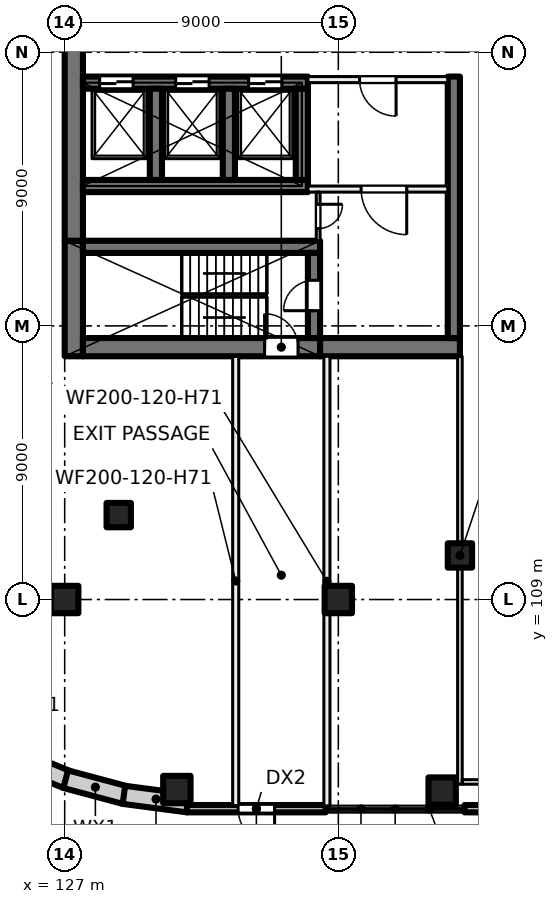
"""IFC4 building model, lengths in metres.
Left out: names, types, materials, properties, quantities, classifications, styles, units other than length and angle.
Written with IfcOpenShell. Run it as: python <this file> out.ifc"""

import sys

from ifc_helpers import new_model, si_unit, direction, frame, frame_2d, origin, origin_2d, place, context, subcontext, project, spatial, rectangle, extrude, element, fill, save


model = new_model("IFC4")
c1 = context("Model", 3, precision=1e-05, world=origin(), true_north=direction((0.0, 1.0)))
c2 = subcontext(c1, "Body", "Model", "MODEL_VIEW")
j1 = project(units=[si_unit("LENGTHUNIT", "METRE"), si_unit("PLANEANGLEUNIT", "RADIAN")], contexts=[c1])
p1 = place(None, origin())
s1 = spatial("IfcSite", under=j1, at=p1, CompositionType="ELEMENT")
p2 = place(p1, origin())
s2 = spatial("IfcBuilding", under=s1, at=p2, CompositionType="ELEMENT")
p3 = place(p2, origin())
s3 = spatial("IfcBuildingStorey", under=s2, at=p3, CompositionType="ELEMENT", Elevation=0.0)
for number, where, z_axis, x_axis in (
    (1, (127.0, 109.0, 0.0), (0.0, 0.0, 1.0), (1.0, 0.0, 0.0)),
    (2, (136.0, 109.0, 0.0), (0.0, 0.0, 1.0), (1.0, 0.0, 0.0)),
    (3, (139.416, 102.7, 0.0), (0.0, 0.0, 1.0), (1.0, 0.0, 0.0)),
    (4, (130.689, 102.75, 0.0), (0.0, 0.0, 1.0), (1.0, 0.0, 0.0)),
):
    element("IfcColumn", number, at=place(p3, frame(where, z_axis=z_axis, x_axis=x_axis)), inside=s3, PredefinedType="COLUMN", context=c2, shape_type="SweptSolid", body=[
        extrude(rectangle(XDim=0.9, YDim=0.9, at=origin_2d()), origin(), (0.0, 0.0, 1.0), 7.5),
    ])
for number, where, z_axis, x_axis in (
    (5, (128.777, 111.777, 0.0), (0.0, 0.0, 1.0), (1.0, 0.0, 0.0)),
    (6, (140.0, 110.45, 0.0), (0.0, 0.0, 1.0), (1.0, 0.0, 0.0)),
):
    element("IfcColumn", number, at=place(p3, frame(where, z_axis=z_axis, x_axis=x_axis)), inside=s3, PredefinedType="COLUMN", context=c2, shape_type="SweptSolid", body=[
        extrude(rectangle(XDim=0.8, YDim=0.8, at=origin_2d()), origin(), (0.0, 0.0, 1.0), 7.5),
    ])
p4 = place(p3, frame((127.3, 117.0, 0.0), z_axis=(0.0, 0.0, 1.0), x_axis=(0.0, 1.0, 0.0)))
e7 = element("IfcWall", 7, at=p4, inside=s3, PredefinedType="SHEAR", context=c2, shape_type="SweptSolid", body=[
    extrude(rectangle(XDim=3.8, YDim=0.6, at=frame_2d((1.9, 0.0))), origin(), (0.0, 0.0, 1.0), 7.5),
])
p5 = place(p3, frame((127.3, 120.8, 0.0), z_axis=(0.0, 0.0, 1.0), x_axis=(0.0, 1.0, 0.0)))
e8 = element("IfcWall", 8, at=p5, inside=s3, PredefinedType="SHEAR", context=c2, shape_type="SweptSolid", body=[
    extrude(rectangle(XDim=14.4, YDim=0.6, at=frame_2d((7.2, 0.0))), origin(), (0.0, 0.0, 1.0), 7.5),
])
p6 = place(p3, frame((127.6, 117.3, 0.0), z_axis=(0.0, 0.0, 1.0), x_axis=(1.0, 0.0, 0.0)))
e9 = element("IfcWall", 9, at=p6, inside=s3, PredefinedType="SHEAR", context=c2, shape_type="SweptSolid", body=[
    extrude(rectangle(XDim=7.8, YDim=0.6, at=frame_2d((3.9, 0.0))), origin(), (0.0, 0.0, 1.0), 7.5),
])
p7 = place(p6, frame((5.975, 0.0, 0.0)))
e10 = element("IfcOpeningElement", 10, at=p7, cuts=e9, PredefinedType="OPENING", context=c2, shape_type="SweptSolid", body=[
    extrude(rectangle(XDim=1.1, YDim=2.1, at=frame_2d((0.55, 1.05))), frame((0.0, 0.31, 0.0), z_axis=(0.0, -1.0, 0.0), x_axis=(1.0, 0.0, 0.0)), (0.0, 0.0, 1.0), 0.62),
])
p8 = place(p3, frame((135.4, 117.3, 0.0), z_axis=(0.0, 0.0, 1.0), x_axis=(1.0, 0.0, 0.0)))
e11 = element("IfcWall", 11, at=p8, inside=s3, PredefinedType="SHEAR", context=c2, shape_type="SweptSolid", body=[
    extrude(rectangle(XDim=4.6, YDim=0.6, at=frame_2d((2.3, 0.0))), origin(), (0.0, 0.0, 1.0), 7.5),
])
p9 = place(p3, frame((127.6, 120.6, 0.0), z_axis=(0.0, 0.0, 1.0), x_axis=(1.0, 0.0, 0.0)))
e12 = element("IfcWall", 12, at=p9, inside=s3, PredefinedType="SHEAR", context=c2, shape_type="SweptSolid", body=[
    extrude(rectangle(XDim=7.8, YDim=0.4, at=frame_2d((3.9, 0.0))), origin(), (0.0, 0.0, 1.0), 7.5),
])
p10 = place(p3, frame((135.2, 117.6, 0.0), z_axis=(0.0, 0.0, 1.0), x_axis=(0.0, 1.0, 0.0)))
e13 = element("IfcWall", 13, at=p10, inside=s3, PredefinedType="SHEAR", context=c2, shape_type="SweptSolid", body=[
    extrude(rectangle(XDim=2.8, YDim=0.4, at=frame_2d((1.4, 0.0))), origin(), (0.0, 0.0, 1.0), 7.5),
])
p11 = place(p10, frame((0.9, 0.0, 0.0)))
e14 = element("IfcOpeningElement", 14, at=p11, cuts=e13, PredefinedType="OPENING", context=c2, shape_type="SweptSolid", body=[
    extrude(rectangle(XDim=1.0, YDim=2.1, at=frame_2d((0.5, 1.05))), frame((0.0, 0.21, 0.0), z_axis=(0.0, -1.0, 0.0), x_axis=(1.0, 0.0, 0.0)), (0.0, 0.0, 1.0), 0.42),
])
p12 = place(p3, frame((127.6, 126.0, 0.0), z_axis=(0.0, 0.0, 1.0), x_axis=(1.0, 0.0, 0.0)))
e15 = element("IfcWall", 15, at=p12, inside=s3, PredefinedType="SHEAR", context=c2, shape_type="SweptSolid", body=[
    extrude(rectangle(XDim=7.4, YDim=0.4, at=frame_2d((3.7, 0.0))), origin(), (0.0, 0.0, 1.0), 7.5),
])
p13 = place(p12, frame((0.55, 0.0, 0.0)))
e16 = element("IfcOpeningElement", 16, at=p13, cuts=e15, PredefinedType="OPENING", context=c2, shape_type="SweptSolid", body=[
    extrude(rectangle(XDim=1.1, YDim=2.1, at=frame_2d((0.55, 1.05))), frame((0.0, 0.21, 0.0), z_axis=(0.0, -1.0, 0.0), x_axis=(1.0, 0.0, 0.0)), (0.0, 0.0, 1.0), 0.42),
])
p14 = place(p12, frame((3.05, 0.0, 0.0)))
e17 = element("IfcOpeningElement", 17, at=p14, cuts=e15, PredefinedType="OPENING", context=c2, shape_type="SweptSolid", body=[
    extrude(rectangle(XDim=1.1, YDim=2.1, at=frame_2d((0.55, 1.05))), frame((0.0, 0.21, 0.0), z_axis=(0.0, -1.0, 0.0), x_axis=(1.0, 0.0, 0.0)), (0.0, 0.0, 1.0), 0.42),
])
p15 = place(p12, frame((5.45, 0.0, 0.0)))
e18 = element("IfcOpeningElement", 18, at=p15, cuts=e15, PredefinedType="OPENING", context=c2, shape_type="SweptSolid", body=[
    extrude(rectangle(XDim=1.1, YDim=2.1, at=frame_2d((0.55, 1.05))), frame((0.0, 0.21, 0.0), z_axis=(0.0, -1.0, 0.0), x_axis=(1.0, 0.0, 0.0)), (0.0, 0.0, 1.0), 0.42),
])
p16 = place(p3, frame((127.6, 122.6, 0.0), z_axis=(0.0, 0.0, 1.0), x_axis=(1.0, 0.0, 0.0)))
e19 = element("IfcWall", 19, at=p16, inside=s3, PredefinedType="SHEAR", context=c2, shape_type="SweptSolid", body=[
    extrude(rectangle(XDim=7.4, YDim=0.4, at=frame_2d((3.7, 0.0))), origin(), (0.0, 0.0, 1.0), 7.5),
])
for number, where, z_axis, x_axis in (
    (20, (130.0, 122.8, 0.0), (0.0, 0.0, 1.0), (0.0, 1.0, 0.0)),
    (21, (132.4, 122.8, 0.0), (0.0, 0.0, 1.0), (0.0, 1.0, 0.0)),
    (22, (134.8, 122.8, 0.0), (0.0, 0.0, 1.0), (0.0, 1.0, 0.0)),
):
    element("IfcWall", number, at=place(p3, frame(where, z_axis=z_axis, x_axis=x_axis)), inside=s3, PredefinedType="SHEAR", context=c2, shape_type="SweptSolid", body=[
        extrude(rectangle(XDim=3.0, YDim=0.4, at=frame_2d((1.5, 0.0))), origin(), (0.0, 0.0, 1.0), 7.5),
    ])
p17 = place(p3, frame((139.8, 117.6, 0.0), z_axis=(0.0, 0.0, 1.0), x_axis=(0.0, 1.0, 0.0)))
e23 = element("IfcWall", 23, at=p17, inside=s3, PredefinedType="SHEAR", context=c2, shape_type="SweptSolid", body=[
    extrude(rectangle(XDim=8.6, YDim=0.4, at=frame_2d((4.3, 0.0))), origin(), (0.0, 0.0, 1.0), 7.5),
])
p18 = place(p3, frame((127.069, 103.079, 0.0), z_axis=(0.0, 0.0, 1.0), x_axis=(-0.924006983526, 0.382375593358, 0.0)))
e24 = element("IfcWall", 24, at=p18, inside=s3, PredefinedType="SOLIDWALL", context=c2, shape_type="SweptSolid", body=[
    extrude(rectangle(XDim=2.114, YDim=0.6, at=frame_2d((1.057, 0.0))), origin(), (0.0, 0.0, 1.0), 7.1),
])
p19 = place(p3, frame((128.986, 102.568, 0.0), z_axis=(0.0, 0.0, 1.0), x_axis=(-0.965929732323, 0.258804467146, 0.0)))
e25 = element("IfcWall", 25, at=p19, inside=s3, PredefinedType="SOLIDWALL", context=c2, shape_type="SweptSolid", body=[
    extrude(rectangle(XDim=2.022, YDim=0.6, at=frame_2d((1.011, 0.0))), origin(), (0.0, 0.0, 1.0), 7.1),
])
p20 = place(p3, frame((131.061, 102.297, 0.0), z_axis=(0.0, 0.0, 1.0), x_axis=(-0.991440646942, 0.130558200013, 0.0)))
e26 = element("IfcWall", 26, at=p20, inside=s3, PredefinedType="SOLIDWALL", context=c2, shape_type="SweptSolid", body=[
    extrude(rectangle(XDim=2.132, YDim=0.6, at=frame_2d((1.066, 0.0))), origin(), (0.0, 0.0, 1.0), 7.1),
])
p21 = place(p3, frame((144.717, 102.12, 0.0), z_axis=(0.0, 0.0, 1.0), x_axis=(-1.0, 0.0, 0.0)))
e27 = element("IfcWall", 27, at=p21, inside=s3, PredefinedType="SOLIDWALL", context=c2, shape_type="SweptSolid", body=[
    extrude(rectangle(XDim=4.565, YDim=0.24, at=frame_2d((2.283, 0.0))), origin(), (0.0, 0.0, 1.0), 7.1),
])
p22 = place(p21, frame((1.283, 0.0, 0.0)))
e28 = element("IfcOpeningElement", 28, at=p22, cuts=e27, PredefinedType="OPENING", context=c2, shape_type="SweptSolid", body=[
    extrude(rectangle(XDim=2.0, YDim=2.5, at=frame_2d((1.0, 1.25))), frame((0.0, 0.13, 0.0), z_axis=(0.0, -1.0, 0.0), x_axis=(1.0, 0.0, 0.0)), (0.0, 0.0, 1.0), 0.26),
])
p23 = place(p3, frame((135.587, 102.12, 0.0), z_axis=(0.0, 0.0, 1.0), x_axis=(-1.0, 0.0, 0.0)))
e29 = element("IfcWall", 29, at=p23, inside=s3, PredefinedType="SOLIDWALL", context=c2, shape_type="SweptSolid", body=[
    extrude(rectangle(XDim=4.565, YDim=0.24, at=frame_2d((2.283, 0.0))), origin(), (0.0, 0.0, 1.0), 7.1),
])
p24 = place(p23, frame((1.683, 0.0, 0.0)))
e30 = element("IfcOpeningElement", 30, at=p24, cuts=e29, PredefinedType="OPENING", context=c2, shape_type="SweptSolid", body=[
    extrude(rectangle(XDim=1.2, YDim=2.4, at=frame_2d((0.6, 1.2))), frame((0.0, 0.13, 0.0), z_axis=(0.0, -1.0, 0.0), x_axis=(1.0, 0.0, 0.0)), (0.0, 0.0, 1.0), 0.26),
])
p25 = place(p3, frame((139.6, 126.1, 0.0), z_axis=(0.0, 0.0, 1.0), x_axis=(-1.0, 0.0, 0.0)))
e31 = element("IfcWall", 31, at=p25, inside=s3, PredefinedType="PARTITIONING", context=c2, shape_type="SweptSolid", body=[
    extrude(rectangle(XDim=4.6, YDim=0.2, at=frame_2d((2.3, 0.0))), origin(), (0.0, 0.0, 1.0), 7.1),
])
p26 = place(p25, frame((1.7, 0.0, 0.0)))
e32 = element("IfcOpeningElement", 32, at=p26, cuts=e31, PredefinedType="OPENING", context=c2, shape_type="SweptSolid", body=[
    extrude(rectangle(XDim=1.2, YDim=2.1, at=frame_2d((0.6, 1.05))), frame((0.0, 0.11, 0.0), z_axis=(0.0, -1.0, 0.0), x_axis=(1.0, 0.0, 0.0)), (0.0, 0.0, 1.0), 0.22),
])
p27 = place(p3, frame((139.6, 122.5, 0.0), z_axis=(0.0, 0.0, 1.0), x_axis=(-1.0, 0.0, 0.0)))
e33 = element("IfcWall", 33, at=p27, inside=s3, PredefinedType="PARTITIONING", context=c2, shape_type="SweptSolid", body=[
    extrude(rectangle(XDim=4.6, YDim=0.2, at=frame_2d((2.3, 0.0))), origin(), (0.0, 0.0, 1.0), 7.1),
])
p28 = place(p27, frame((1.35, 0.0, 0.0)))
e34 = element("IfcOpeningElement", 34, at=p28, cuts=e33, PredefinedType="OPENING", context=c2, shape_type="SweptSolid", body=[
    extrude(rectangle(XDim=1.5, YDim=2.1, at=frame_2d((0.75, 1.05))), frame((0.0, 0.11, 0.0), z_axis=(0.0, -1.0, 0.0), x_axis=(1.0, 0.0, 0.0)), (0.0, 0.0, 1.0), 0.22),
])
p29 = place(p3, frame((135.337, 122.4, 0.0), z_axis=(0.0, 0.0, 1.0), x_axis=(0.0, -1.0, 0.0)))
e35 = element("IfcWall", 35, at=p29, inside=s3, PredefinedType="PARTITIONING", context=c2, shape_type="SweptSolid", body=[
    extrude(rectangle(XDim=1.6, YDim=0.125, at=frame_2d((0.8, 0.0))), origin(), (0.0, 0.0, 1.0), 7.1),
])
p30 = place(p29, frame((0.4, 0.0, 0.0)))
e36 = element("IfcOpeningElement", 36, at=p30, cuts=e35, PredefinedType="OPENING", context=c2, shape_type="SweptSolid", body=[
    extrude(rectangle(XDim=0.8, YDim=2.1, at=frame_2d((0.4, 1.05))), frame((0.0, 0.073, 0.0), z_axis=(0.0, -1.0, 0.0), x_axis=(1.0, 0.0, 0.0)), (0.0, 0.0, 1.0), 0.145),
])
p31 = place(p3, frame((132.625, 102.22, 0.0), z_axis=(0.0, 0.0, 1.0), x_axis=(0.0, 1.0, 0.0)))
e37 = element("IfcWall", 37, at=p31, inside=s3, PredefinedType="PARTITIONING", context=c2, shape_type="SweptSolid", body=[
    extrude(rectangle(XDim=14.78, YDim=0.2, at=frame_2d((7.39, 0.0))), origin(), (0.0, 0.0, 1.0), 7.1),
])
p32 = place(p3, frame((135.625, 102.2, 0.0), z_axis=(0.0, 0.0, 1.0), x_axis=(0.0, 1.0, 0.0)))
e38 = element("IfcWall", 38, at=p32, inside=s3, PredefinedType="PARTITIONING", context=c2, shape_type="SweptSolid", body=[
    extrude(rectangle(XDim=14.8, YDim=0.2, at=frame_2d((7.4, 0.0))), origin(), (0.0, 0.0, 1.0), 7.1),
])
p33 = place(p3, frame((140.0, 102.925, 0.0), z_axis=(0.0, 0.0, 1.0), x_axis=(0.0, 1.0, 0.0)))
e39 = element("IfcWall", 39, at=p33, inside=s3, PredefinedType="PARTITIONING", context=c2, shape_type="SweptSolid", body=[
    extrude(rectangle(XDim=14.075, YDim=0.15, at=frame_2d((7.038, 0.0))), origin(), (0.0, 0.0, 1.0), 7.1),
])
p34 = place(p3, frame((140.075, 103.0, 0.0), z_axis=(0.0, 0.0, 1.0), x_axis=(1.0, 0.0, 0.0)))
e40 = element("IfcWall", 40, at=p34, inside=s3, PredefinedType="PARTITIONING", context=c2, shape_type="SweptSolid", body=[
    extrude(rectangle(XDim=14.0, YDim=0.15, at=frame_2d((7.0, 0.0))), origin(), (0.0, 0.0, 1.0), 7.1),
])
p35 = place(p24, origin())
e41 = element("IfcDoor", 41, at=p35, inside=s3, OperationType="SINGLE_SWING_RIGHT", PredefinedType="DOOR", context=c2, shape_type="SweptSolid", body=[
    extrude(rectangle(XDim=1.2, YDim=2.4, at=frame_2d((0.6, 1.2))), frame((0.0, 0.025, 0.0), z_axis=(0.0, -1.0, 0.0), x_axis=(1.0, 0.0, 0.0)), (0.0, 0.0, 1.0), 0.05),
])
fill(e30, e41)
p36 = place(p13, origin())
e42 = element("IfcDoor", 42, at=p36, inside=s3, OperationType="DOUBLE_DOOR_SLIDING", PredefinedType="DOOR", context=c2, shape_type="SweptSolid", body=[
    extrude(rectangle(XDim=1.1, YDim=2.1, at=frame_2d((0.55, 1.05))), frame((0.0, 0.025, 0.0), z_axis=(0.0, -1.0, 0.0), x_axis=(1.0, 0.0, 0.0)), (0.0, 0.0, 1.0), 0.05),
])
fill(e16, e42)
p37 = place(p14, origin())
e43 = element("IfcDoor", 43, at=p37, inside=s3, OperationType="DOUBLE_DOOR_SLIDING", PredefinedType="DOOR", context=c2, shape_type="SweptSolid", body=[
    extrude(rectangle(XDim=1.1, YDim=2.1, at=frame_2d((0.55, 1.05))), frame((0.0, 0.025, 0.0), z_axis=(0.0, -1.0, 0.0), x_axis=(1.0, 0.0, 0.0)), (0.0, 0.0, 1.0), 0.05),
])
fill(e17, e43)
p38 = place(p15, origin())
e44 = element("IfcDoor", 44, at=p38, inside=s3, OperationType="DOUBLE_DOOR_SLIDING", PredefinedType="DOOR", context=c2, shape_type="SweptSolid", body=[
    extrude(rectangle(XDim=1.1, YDim=2.1, at=frame_2d((0.55, 1.05))), frame((0.0, 0.025, 0.0), z_axis=(0.0, -1.0, 0.0), x_axis=(1.0, 0.0, 0.0)), (0.0, 0.0, 1.0), 0.05),
])
fill(e18, e44)
p39 = place(p26, origin())
e45 = element("IfcDoor", 45, at=p39, inside=s3, OperationType="DOUBLE_DOOR_SINGLE_SWING", PredefinedType="DOOR", context=c2, shape_type="SweptSolid", body=[
    extrude(rectangle(XDim=1.2, YDim=2.1, at=frame_2d((0.6, 1.05))), frame((0.0, 0.025, 0.0), z_axis=(0.0, -1.0, 0.0), x_axis=(1.0, 0.0, 0.0)), (0.0, 0.0, 1.0), 0.05),
])
fill(e32, e45)
p40 = place(p28, origin())
e46 = element("IfcDoor", 46, at=p40, inside=s3, OperationType="DOUBLE_DOOR_SINGLE_SWING", PredefinedType="DOOR", context=c2, shape_type="SweptSolid", body=[
    extrude(rectangle(XDim=1.5, YDim=2.1, at=frame_2d((0.75, 1.05))), frame((0.0, 0.025, 0.0), z_axis=(0.0, -1.0, 0.0), x_axis=(1.0, 0.0, 0.0)), (0.0, 0.0, 1.0), 0.05),
])
fill(e34, e46)
p41 = place(p11, origin())
e47 = element("IfcDoor", 47, at=p41, inside=s3, OperationType="SINGLE_SWING_RIGHT", PredefinedType="DOOR", context=c2, shape_type="SweptSolid", body=[
    extrude(rectangle(XDim=1.0, YDim=2.1, at=frame_2d((0.5, 1.05))), frame((0.0, 0.025, 0.0), z_axis=(0.0, -1.0, 0.0), x_axis=(1.0, 0.0, 0.0)), (0.0, 0.0, 1.0), 0.05),
])
fill(e14, e47)
p42 = place(p30, origin())
e48 = element("IfcDoor", 48, at=p42, inside=s3, OperationType="SINGLE_SWING_LEFT", PredefinedType="DOOR", context=c2, shape_type="SweptSolid", body=[
    extrude(rectangle(XDim=0.8, YDim=2.1, at=frame_2d((0.4, 1.05))), frame((0.0, 0.025, 0.0), z_axis=(0.0, -1.0, 0.0), x_axis=(1.0, 0.0, 0.0)), (0.0, 0.0, 1.0), 0.05),
])
fill(e36, e48)
p43 = place(p7, origin())
e49 = element("IfcDoor", 49, at=p43, inside=s3, OperationType="SINGLE_SWING_LEFT", PredefinedType="DOOR", context=c2, shape_type="SweptSolid", body=[
    extrude(rectangle(XDim=1.1, YDim=2.1, at=frame_2d((0.55, 1.05))), frame((0.0, 0.025, 0.0), z_axis=(0.0, -1.0, 0.0), x_axis=(1.0, 0.0, 0.0)), (0.0, 0.0, 1.0), 0.05),
])
fill(e10, e49)
save(model, sys.argv[1])
